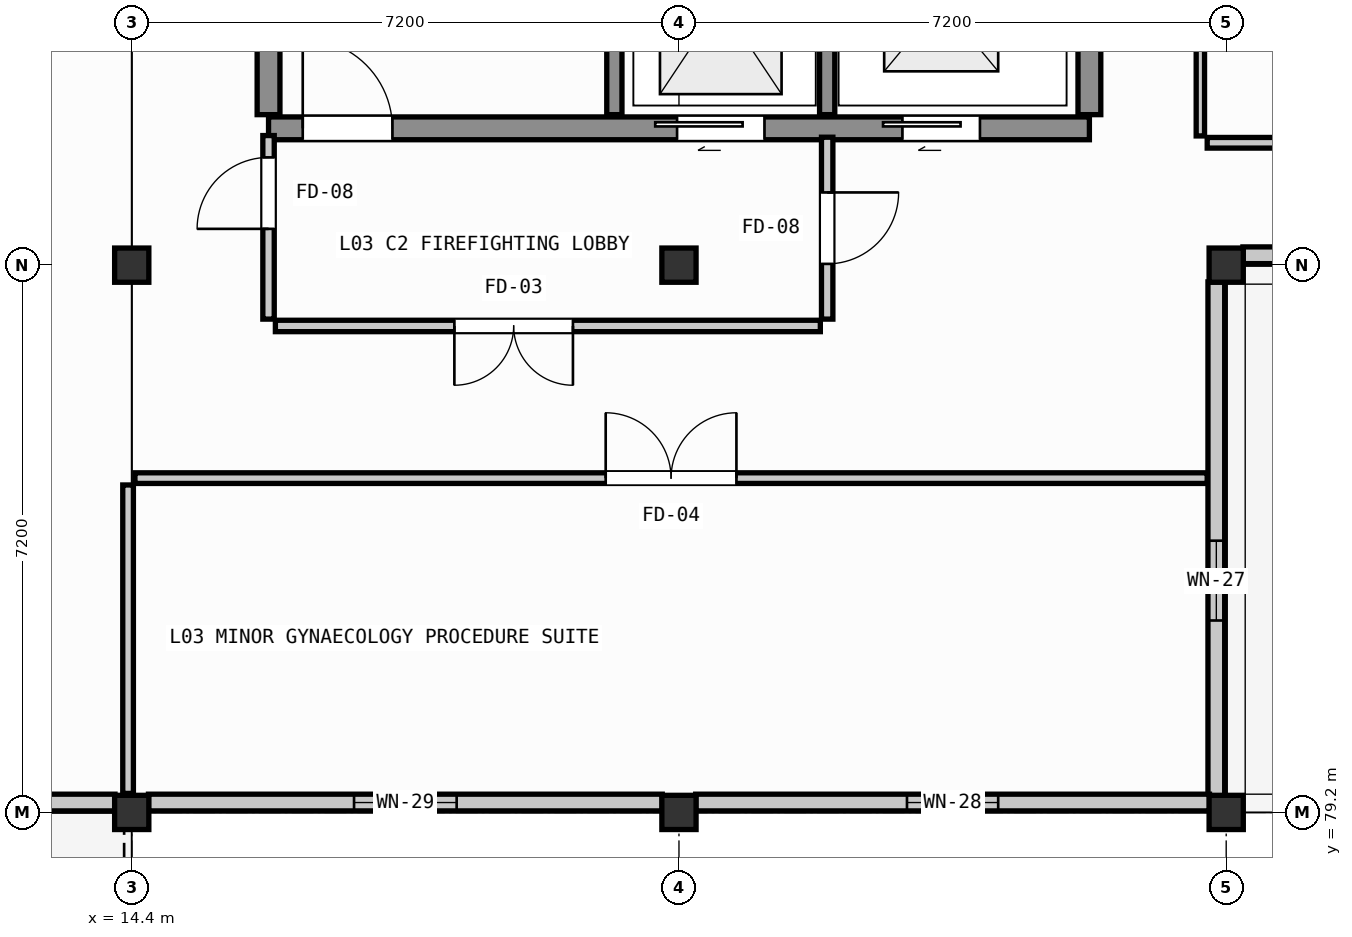
"""IFC4 building model, lengths in metres.
Left out: names, types, materials, properties, quantities, classifications, styles, units other than length and angle.
Written with IfcOpenShell. Run it as: python <this file> out.ifc"""

import sys

from ifc_helpers import new_model, si_unit, direction, frame, frame_2d, origin, origin_2d, place, context, subcontext, project, spatial, rectangle, extrude, element, fill, save


model = new_model("IFC4")
c1 = context("Model", 3, precision=1e-05, world=origin(), true_north=direction((0.0, 1.0)))
c2 = subcontext(c1, "Body", "Model", "MODEL_VIEW")
j1 = project(units=[si_unit("LENGTHUNIT", "METRE"), si_unit("PLANEANGLEUNIT", "RADIAN")], contexts=[c1])
p1 = place(None, origin())
s1 = spatial("IfcSite", under=j1, at=p1, CompositionType="ELEMENT")
p2 = place(p1, origin())
s2 = spatial("IfcBuilding", under=s1, at=p2, CompositionType="ELEMENT")
p3 = place(p2, frame((0.0, 0.0, 9.3)))
s3 = spatial("IfcBuildingStorey", under=s2, at=p3, CompositionType="ELEMENT", Elevation=9.3)
for number, where, z_axis, x_axis in (
    (1, (14.4, 79.2, 0.0), (0.0, 0.0, 1.0), (1.0, 0.0, 0.0)),
    (2, (14.4, 86.4, 0.0), (0.0, 0.0, 1.0), (1.0, 0.0, 0.0)),
    (3, (21.6, 79.2, 0.0), (0.0, 0.0, 1.0), (1.0, 0.0, 0.0)),
    (4, (21.6, 86.4, 0.0), (0.0, 0.0, 1.0), (1.0, 0.0, 0.0)),
    (5, (28.8, 79.2, 0.0), (0.0, 0.0, 1.0), (1.0, 0.0, 0.0)),
    (6, (28.8, 86.4, 0.0), (0.0, 0.0, 1.0), (1.0, 0.0, 0.0)),
):
    element("IfcColumn", number, at=place(p3, frame(where, z_axis=z_axis, x_axis=x_axis)), inside=s3, PredefinedType="COLUMN", context=c2, shape_type="SweptSolid", body=[
        extrude(rectangle(XDim=0.45, YDim=0.45, at=origin_2d()), origin(), (0.0, 0.0, 1.0), 3.99),
    ])
p4 = place(p3, frame((35.78, 86.53, 0.0), z_axis=(0.0, 0.0, 1.0), x_axis=(-1.0, 0.0, 0.0)))
e7 = element("IfcWall", 7, at=p4, inside=s3, PredefinedType="SOLIDWALL", context=c2, shape_type="SweptSolid", body=[
    extrude(rectangle(XDim=6.76, YDim=0.22, at=frame_2d((3.38, 0.0))), origin(), (0.0, 0.0, 1.0), 3.27),
])
p5 = place(p4, frame((2.93, 0.0, 0.95)))
e8 = element("IfcOpeningElement", 8, at=p5, cuts=e7, PredefinedType="OPENING", context=c2, shape_type="SweptSolid", body=[
    extrude(rectangle(XDim=0.9, YDim=1.25, at=frame_2d((0.45, 0.625))), frame((0.0, 0.12, 0.0), z_axis=(0.0, -1.0, 0.0), x_axis=(1.0, 0.0, 0.0)), (0.0, 0.0, 1.0), 0.24),
])
p6 = place(p3, frame((28.67, 86.18, 0.0), z_axis=(0.0, 0.0, 1.0), x_axis=(0.0, -1.0, 0.0)))
e9 = element("IfcWall", 9, at=p6, inside=s3, PredefinedType="SOLIDWALL", context=c2, shape_type="SweptSolid", body=[
    extrude(rectangle(XDim=6.76, YDim=0.22, at=frame_2d((3.38, 0.0))), origin(), (0.0, 0.0, 1.0), 3.27),
])
p7 = place(p6, frame((3.405, 0.0, 0.95)))
e10 = element("IfcOpeningElement", 10, at=p7, cuts=e9, PredefinedType="OPENING", context=c2, shape_type="SweptSolid", body=[
    extrude(rectangle(XDim=1.05, YDim=1.25, at=frame_2d((0.525, 0.625))), frame((0.0, 0.12, 0.0), z_axis=(0.0, -1.0, 0.0), x_axis=(1.0, 0.0, 0.0)), (0.0, 0.0, 1.0), 0.24),
])
p8 = place(p3, frame((28.58, 79.33, 0.0), z_axis=(0.0, 0.0, 1.0), x_axis=(-1.0, 0.0, 0.0)))
e11 = element("IfcWall", 11, at=p8, inside=s3, PredefinedType="SOLIDWALL", context=c2, shape_type="SweptSolid", body=[
    extrude(rectangle(XDim=6.76, YDim=0.22, at=frame_2d((3.38, 0.0))), origin(), (0.0, 0.0, 1.0), 3.27),
])
p9 = place(p8, frame((2.78, 0.0, 0.95)))
e12 = element("IfcOpeningElement", 12, at=p9, cuts=e11, PredefinedType="OPENING", context=c2, shape_type="SweptSolid", body=[
    extrude(rectangle(XDim=1.2, YDim=1.25, at=frame_2d((0.6, 0.625))), frame((0.0, 0.12, 0.0), z_axis=(0.0, -1.0, 0.0), x_axis=(1.0, 0.0, 0.0)), (0.0, 0.0, 1.0), 0.24),
])
p10 = place(p3, frame((21.38, 79.33, 0.0), z_axis=(0.0, 0.0, 1.0), x_axis=(-1.0, 0.0, 0.0)))
e13 = element("IfcWall", 13, at=p10, inside=s3, PredefinedType="SOLIDWALL", context=c2, shape_type="SweptSolid", body=[
    extrude(rectangle(XDim=6.76, YDim=0.22, at=frame_2d((3.38, 0.0))), origin(), (0.0, 0.0, 1.0), 3.27),
])
p11 = place(p10, frame((2.705, 0.0, 0.95)))
e14 = element("IfcOpeningElement", 14, at=p11, cuts=e13, PredefinedType="OPENING", context=c2, shape_type="SweptSolid", body=[
    extrude(rectangle(XDim=1.35, YDim=1.25, at=frame_2d((0.675, 0.625))), frame((0.0, 0.12, 0.0), z_axis=(0.0, -1.0, 0.0), x_axis=(1.0, 0.0, 0.0)), (0.0, 0.0, 1.0), 0.24),
])
p12 = place(p3, frame((14.18, 79.33, 0.0), z_axis=(0.0, 0.0, 1.0), x_axis=(-1.0, 0.0, 0.0)))
e15 = element("IfcWall", 15, at=p12, inside=s3, PredefinedType="SOLIDWALL", context=c2, shape_type="SweptSolid", body=[
    extrude(rectangle(XDim=6.76, YDim=0.22, at=frame_2d((3.38, 0.0))), origin(), (0.0, 0.0, 1.0), 3.27),
])
p13 = place(p12, frame((3.53, 0.0, 0.0)))
e16 = element("IfcOpeningElement", 16, at=p13, cuts=e15, PredefinedType="OPENING", context=c2, shape_type="SweptSolid", body=[
    extrude(rectangle(XDim=1.9, YDim=2.3, at=frame_2d((0.95, 1.15))), frame((0.0, 0.12, 0.0), z_axis=(0.0, -1.0, 0.0), x_axis=(1.0, 0.0, 0.0)), (0.0, 0.0, 1.0), 0.24),
])
p14 = place(p3, frame((16.2, 88.2, 0.0), z_axis=(0.0, 0.0, 1.0), x_axis=(1.0, 0.0, 0.0)))
e17 = element("IfcWall", 17, at=p14, inside=s3, PredefinedType="SHEAR", context=c2, shape_type="SweptSolid", body=[
    extrude(rectangle(XDim=10.8, YDim=0.3, at=frame_2d((5.4, 0.0))), origin(), (0.0, 0.0, 1.0), 4.2),
])
p15 = place(p14, frame((0.45, 0.0, 0.0)))
e18 = element("IfcOpeningElement", 18, at=p15, cuts=e17, PredefinedType="OPENING", context=c2, shape_type="SweptSolid", body=[
    extrude(rectangle(XDim=1.18, YDim=2.16, at=frame_2d((0.59, 1.08))), frame((0.0, 0.16, 0.0), z_axis=(0.0, -1.0, 0.0), x_axis=(1.0, 0.0, 0.0)), (0.0, 0.0, 1.0), 0.32),
])
p16 = place(p14, frame((5.375, 0.0, 0.0)))
e19 = element("IfcOpeningElement", 19, at=p16, cuts=e17, PredefinedType="OPENING", context=c2, shape_type="SweptSolid", body=[
    extrude(rectangle(XDim=1.15, YDim=2.15, at=frame_2d((0.575, 1.075))), frame((0.0, 0.16, 0.0), z_axis=(0.0, -1.0, 0.0), x_axis=(1.0, 0.0, 0.0)), (0.0, 0.0, 1.0), 0.32),
])
p17 = place(p14, frame((8.34, 0.0, 0.0)))
e20 = element("IfcOpeningElement", 20, at=p17, cuts=e17, PredefinedType="OPENING", context=c2, shape_type="SweptSolid", body=[
    extrude(rectangle(XDim=1.02, YDim=2.12, at=frame_2d((0.51, 1.06))), frame((0.0, 0.16, 0.0), z_axis=(0.0, -1.0, 0.0), x_axis=(1.0, 0.0, 0.0)), (0.0, 0.0, 1.0), 0.32),
])
for number, where, z_axis, x_axis in (
    (21, (16.2, 88.38, 0.0), (0.0, 0.0, 1.0), (0.0, 1.0, 0.0)),
    (22, (27.0, 88.38, 0.0), (0.0, 0.0, 1.0), (0.0, 1.0, 0.0)),
):
    element("IfcWall", number, at=place(p3, frame(where, z_axis=z_axis, x_axis=x_axis)), inside=s3, PredefinedType="SHEAR", context=c2, shape_type="SweptSolid", body=[
        extrude(rectangle(XDim=6.24, YDim=0.3, at=frame_2d((3.12, 0.0))), origin(), (0.0, 0.0, 1.0), 4.2),
    ])
for number, where, z_axis, x_axis in (
    (23, (20.75, 88.38, 0.0), (0.0, 0.0, 1.0), (0.0, 1.0, 0.0)),
    (24, (23.55, 88.38, 0.0), (0.0, 0.0, 1.0), (0.0, 1.0, 0.0)),
):
    element("IfcWall", number, at=place(p3, frame(where, z_axis=z_axis, x_axis=x_axis)), inside=s3, PredefinedType="SHEAR", context=c2, shape_type="SweptSolid", body=[
        extrude(rectangle(XDim=3.15, YDim=0.2, at=frame_2d((1.575, 0.0))), origin(), (0.0, 0.0, 1.0), 4.2),
    ])
p18 = place(p3, frame((16.2, 85.69, 0.0), z_axis=(0.0, 0.0, 1.0), x_axis=(0.0, 1.0, 0.0)))
e25 = element("IfcWall", 25, at=p18, inside=s3, PredefinedType="PARTITIONING", context=c2, shape_type="SweptSolid", body=[
    extrude(rectangle(XDim=2.415, YDim=0.15, at=frame_2d((1.208, 0.0))), origin(), (0.0, 0.0, 1.0), 3.27),
])
p19 = place(p18, frame((1.188, 0.0, 0.0)))
e26 = element("IfcOpeningElement", 26, at=p19, cuts=e25, PredefinedType="OPENING", context=c2, shape_type="SweptSolid", body=[
    extrude(rectangle(XDim=0.94, YDim=2.1, at=frame_2d((0.47, 1.05))), frame((0.0, 0.085, 0.0), z_axis=(0.0, -1.0, 0.0), x_axis=(1.0, 0.0, 0.0)), (0.0, 0.0, 1.0), 0.17),
])
p20 = place(p3, frame((23.55, 88.083, 0.0), z_axis=(0.0, 0.0, 1.0), x_axis=(0.0, -1.0, 0.0)))
e27 = element("IfcWall", 27, at=p20, inside=s3, PredefinedType="PARTITIONING", context=c2, shape_type="SweptSolid", body=[
    extrude(rectangle(XDim=2.393, YDim=0.15, at=frame_2d((1.197, 0.0))), origin(), (0.0, 0.0, 1.0), 3.27),
])
p21 = place(p20, frame((0.727, 0.0, 0.0)))
e28 = element("IfcOpeningElement", 28, at=p21, cuts=e27, PredefinedType="OPENING", context=c2, shape_type="SweptSolid", body=[
    extrude(rectangle(XDim=0.94, YDim=2.1, at=frame_2d((0.47, 1.05))), frame((0.0, 0.085, 0.0), z_axis=(0.0, -1.0, 0.0), x_axis=(1.0, 0.0, 0.0)), (0.0, 0.0, 1.0), 0.17),
])
p22 = place(p3, frame((23.46, 85.6, 0.0), z_axis=(0.0, 0.0, 1.0), x_axis=(-1.0, 0.0, 0.0)))
e29 = element("IfcWall", 29, at=p22, inside=s3, PredefinedType="PARTITIONING", context=c2, shape_type="SweptSolid", body=[
    extrude(rectangle(XDim=7.17, YDim=0.15, at=frame_2d((3.585, 0.0))), origin(), (0.0, 0.0, 1.0), 3.35),
])
p23 = place(p22, frame((3.255, 0.0, 0.0)))
e30 = element("IfcOpeningElement", 30, at=p23, cuts=e29, PredefinedType="OPENING", context=c2, shape_type="SweptSolid", body=[
    extrude(rectangle(XDim=1.56, YDim=2.22, at=frame_2d((0.78, 1.11))), frame((0.0, 0.085, 0.0), z_axis=(0.0, -1.0, 0.0), x_axis=(1.0, 0.0, 0.0)), (0.0, 0.0, 1.0), 0.17),
])
p24 = place(p3, frame((14.352, 79.45, 0.0), z_axis=(0.0, 0.0, 1.0), x_axis=(0.0, 1.0, 0.0)))
e31 = element("IfcWall", 31, at=p24, inside=s3, PredefinedType="PARTITIONING", context=c2, shape_type="SweptSolid", body=[
    extrude(rectangle(XDim=4.058, YDim=0.14, at=frame_2d((2.029, 0.0))), origin(), (0.0, 0.0, 1.0), 3.27),
])
p25 = place(p3, frame((14.442, 83.598, 0.0), z_axis=(0.0, 0.0, 1.0), x_axis=(1.0, 0.0, 0.0)))
e32 = element("IfcWall", 32, at=p25, inside=s3, PredefinedType="PARTITIONING", context=c2, shape_type="SweptSolid", body=[
    extrude(rectangle(XDim=14.108, YDim=0.14, at=frame_2d((7.054, 0.0))), origin(), (0.0, 0.0, 1.0), 3.35),
])
p26 = place(p25, frame((6.194, 0.0, 0.0)))
e33 = element("IfcOpeningElement", 33, at=p26, cuts=e32, PredefinedType="OPENING", context=c2, shape_type="SweptSolid", body=[
    extrude(rectangle(XDim=1.72, YDim=2.26, at=frame_2d((0.86, 1.13))), frame((0.0, 0.08, 0.0), z_axis=(0.0, -1.0, 0.0), x_axis=(1.0, 0.0, 0.0)), (0.0, 0.0, 1.0), 0.16),
])
p27 = place(p3, frame((39.11, 88.01, 0.0), z_axis=(0.0, 0.0, 1.0), x_axis=(-1.0, 0.0, 0.0)))
e34 = element("IfcWall", 34, at=p27, inside=s3, PredefinedType="PARTITIONING", context=c2, shape_type="SweptSolid", body=[
    extrude(rectangle(XDim=10.56, YDim=0.14, at=frame_2d((5.28, 0.0))), origin(), (0.0, 0.0, 1.0), 3.35),
])
p28 = place(p27, frame((4.62, 0.0, 0.0)))
e35 = element("IfcOpeningElement", 35, at=p28, cuts=e34, PredefinedType="OPENING", context=c2, shape_type="SweptSolid", body=[
    extrude(rectangle(XDim=1.32, YDim=2.2, at=frame_2d((0.66, 1.1))), frame((0.0, 0.08, 0.0), z_axis=(0.0, -1.0, 0.0), x_axis=(1.0, 0.0, 0.0)), (0.0, 0.0, 1.0), 0.16),
])
p29 = place(p3, frame((28.46, 88.1, 0.0), z_axis=(0.0, 0.0, 1.0), x_axis=(0.0, 1.0, 0.0)))
e36 = element("IfcWall", 36, at=p29, inside=s3, PredefinedType="PARTITIONING", context=c2, shape_type="SweptSolid", body=[
    extrude(rectangle(XDim=17.41, YDim=0.11, at=frame_2d((8.705, 0.0))), origin(), (0.0, 0.0, 1.0), 3.97),
])
p30 = place(p7, origin())
e37 = element("IfcWindow", 37, at=p30, inside=s3, PartitioningType="SINGLE_PANEL", PredefinedType="WINDOW", context=c2, shape_type="SweptSolid", body=[
    extrude(rectangle(XDim=1.05, YDim=1.25, at=frame_2d((0.525, 0.625))), frame((0.0, 0.03, 0.0), z_axis=(0.0, -1.0, 0.0), x_axis=(1.0, 0.0, 0.0)), (0.0, 0.0, 1.0), 0.06),
])
fill(e10, e37)
p31 = place(p9, origin())
e38 = element("IfcWindow", 38, at=p31, inside=s3, PartitioningType="SINGLE_PANEL", PredefinedType="WINDOW", context=c2, shape_type="SweptSolid", body=[
    extrude(rectangle(XDim=1.2, YDim=1.25, at=frame_2d((0.6, 0.625))), frame((0.0, 0.03, 0.0), z_axis=(0.0, -1.0, 0.0), x_axis=(1.0, 0.0, 0.0)), (0.0, 0.0, 1.0), 0.06),
])
fill(e12, e38)
p32 = place(p11, origin())
e39 = element("IfcWindow", 39, at=p32, inside=s3, PartitioningType="SINGLE_PANEL", PredefinedType="WINDOW", context=c2, shape_type="SweptSolid", body=[
    extrude(rectangle(XDim=1.35, YDim=1.25, at=frame_2d((0.675, 0.625))), frame((0.0, 0.03, 0.0), z_axis=(0.0, -1.0, 0.0), x_axis=(1.0, 0.0, 0.0)), (0.0, 0.0, 1.0), 0.06),
])
fill(e14, e39)
p33 = place(p15, origin())
e40 = element("IfcDoor", 40, at=p33, inside=s3, OperationType="SINGLE_SWING_LEFT", PredefinedType="DOOR", context=c2, shape_type="SweptSolid", body=[
    extrude(rectangle(XDim=1.18, YDim=2.16, at=frame_2d((0.59, 1.08))), frame((0.0, 0.025, 0.0), z_axis=(0.0, -1.0, 0.0), x_axis=(1.0, 0.0, 0.0)), (0.0, 0.0, 1.0), 0.05),
])
fill(e18, e40)
p34 = place(p16, origin())
e41 = element("IfcDoor", 41, at=p34, inside=s3, OperationType="DOUBLE_DOOR_SLIDING", PredefinedType="DOOR", context=c2, shape_type="SweptSolid", body=[
    extrude(rectangle(XDim=1.15, YDim=2.15, at=frame_2d((0.575, 1.075))), frame((0.0, 0.025, 0.0), z_axis=(0.0, -1.0, 0.0), x_axis=(1.0, 0.0, 0.0)), (0.0, 0.0, 1.0), 0.05),
])
fill(e19, e41)
p35 = place(p17, origin())
e42 = element("IfcDoor", 42, at=p35, inside=s3, OperationType="SLIDING_TO_LEFT", PredefinedType="DOOR", context=c2, shape_type="SweptSolid", body=[
    extrude(rectangle(XDim=1.02, YDim=2.12, at=frame_2d((0.51, 1.06))), frame((0.0, 0.025, 0.0), z_axis=(0.0, -1.0, 0.0), x_axis=(1.0, 0.0, 0.0)), (0.0, 0.0, 1.0), 0.05),
])
fill(e20, e42)
p36 = place(p19, origin())
e43 = element("IfcDoor", 43, at=p36, inside=s3, OperationType="SINGLE_SWING_LEFT", PredefinedType="DOOR", context=c2, shape_type="SweptSolid", body=[
    extrude(rectangle(XDim=0.94, YDim=2.1, at=frame_2d((0.47, 1.05))), frame((0.0, 0.025, 0.0), z_axis=(0.0, -1.0, 0.0), x_axis=(1.0, 0.0, 0.0)), (0.0, 0.0, 1.0), 0.05),
])
fill(e26, e43)
p37 = place(p21, origin())
e44 = element("IfcDoor", 44, at=p37, inside=s3, OperationType="SINGLE_SWING_LEFT", PredefinedType="DOOR", context=c2, shape_type="SweptSolid", body=[
    extrude(rectangle(XDim=0.94, YDim=2.1, at=frame_2d((0.47, 1.05))), frame((0.0, 0.025, 0.0), z_axis=(0.0, -1.0, 0.0), x_axis=(1.0, 0.0, 0.0)), (0.0, 0.0, 1.0), 0.05),
])
fill(e28, e44)
p38 = place(p23, origin())
e45 = element("IfcDoor", 45, at=p38, inside=s3, OperationType="DOUBLE_DOOR_SINGLE_SWING", PredefinedType="DOOR", context=c2, shape_type="SweptSolid", body=[
    extrude(rectangle(XDim=1.56, YDim=2.22, at=frame_2d((0.78, 1.11))), frame((0.0, 0.025, 0.0), z_axis=(0.0, -1.0, 0.0), x_axis=(1.0, 0.0, 0.0)), (0.0, 0.0, 1.0), 0.05),
])
fill(e30, e45)
p39 = place(p26, origin())
e46 = element("IfcDoor", 46, at=p39, inside=s3, OperationType="DOUBLE_DOOR_SINGLE_SWING", PredefinedType="DOOR", context=c2, shape_type="SweptSolid", body=[
    extrude(rectangle(XDim=1.72, YDim=2.26, at=frame_2d((0.86, 1.13))), frame((0.0, 0.025, 0.0), z_axis=(0.0, -1.0, 0.0), x_axis=(1.0, 0.0, 0.0)), (0.0, 0.0, 1.0), 0.05),
])
fill(e33, e46)
save(model, sys.argv[1])
